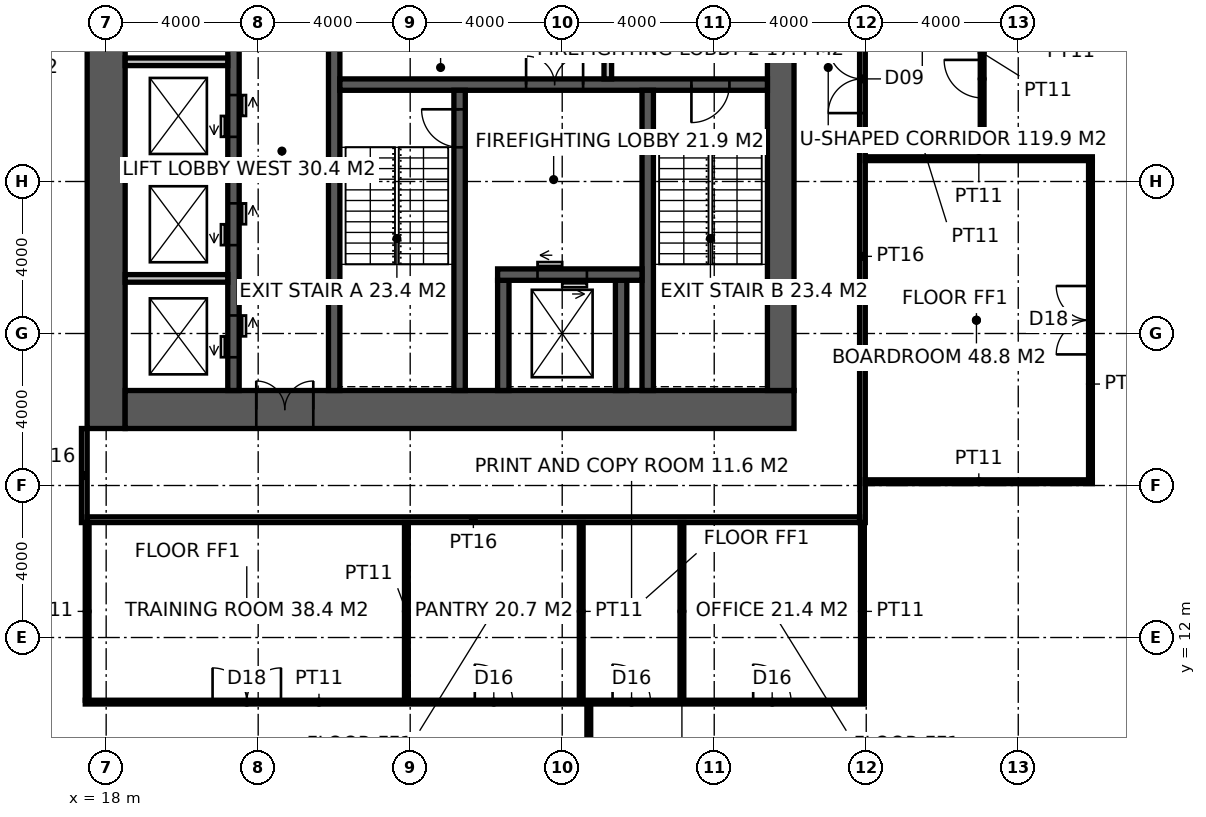
"""IFC4 building model, lengths in metres.
Left out: names, types, materials, properties, quantities, classifications, styles, units other than length and angle.
Written with IfcOpenShell. Run it as: python <this file> out.ifc"""

import sys

from ifc_helpers import new_model, si_unit, direction, frame, frame_2d, origin, place, context, subcontext, project, spatial, rectangle, extrude, element, fill, save


model = new_model("IFC4")
c1 = context("Model", 3, precision=1e-05, world=origin(), true_north=direction((0.0, 1.0)))
c2 = subcontext(c1, "Body", "Model", "MODEL_VIEW")
j1 = project(units=[si_unit("LENGTHUNIT", "METRE"), si_unit("PLANEANGLEUNIT", "RADIAN")], contexts=[c1])
p1 = place(None, origin())
s1 = spatial("IfcSite", under=j1, at=p1, CompositionType="ELEMENT")
p2 = place(p1, origin())
s2 = spatial("IfcBuilding", under=s1, at=p2, CompositionType="ELEMENT")
p3 = place(p2, frame((0.0, 0.0, 109.4)))
s3 = spatial("IfcBuildingStorey", under=s2, at=p3, CompositionType="ELEMENT", Elevation=109.4)
p4 = place(p3, frame((18.0, 17.5, -0.15), z_axis=(0.0, 0.0, 1.0), x_axis=(0.0, 1.0, 0.0)))
e1 = element("IfcWall", 1, at=p4, inside=s3, PredefinedType="SHEAR", context=c2, shape_type="SweptSolid", body=[
    extrude(rectangle(XDim=19.0, YDim=1.0, at=frame_2d((9.5, 0.0))), origin(), (0.0, 0.0, 1.0), 4.0),
])
p5 = place(p3, frame((18.5, 18.0, -0.15), z_axis=(0.0, 0.0, 1.0), x_axis=(1.0, 0.0, 0.0)))
e2 = element("IfcWall", 2, at=p5, inside=s3, PredefinedType="SHEAR", context=c2, shape_type="SweptSolid", body=[
    extrude(rectangle(XDim=17.6, YDim=1.0, at=frame_2d((8.8, 0.0))), origin(), (0.0, 0.0, 1.0), 4.0),
])
p6 = place(p5, frame((3.45, 0.0, 0.15)))
e3 = element("IfcOpeningElement", 3, at=p6, cuts=e2, PredefinedType="OPENING", context=c2, shape_type="SweptSolid", body=[
    extrude(rectangle(XDim=1.5, YDim=2.4, at=frame_2d((0.75, 1.2))), frame((0.0, 0.51, 0.0), z_axis=(0.0, -1.0, 0.0), x_axis=(1.0, 0.0, 0.0)), (0.0, 0.0, 1.0), 1.02),
])
p7 = place(p3, frame((35.75, 18.5, -0.15), z_axis=(0.0, 0.0, 1.0), x_axis=(0.0, 1.0, 0.0)))
e4 = element("IfcWall", 4, at=p7, inside=s3, PredefinedType="SHEAR", context=c2, shape_type="SweptSolid", body=[
    extrude(rectangle(XDim=17.0, YDim=0.7, at=frame_2d((8.5, 0.0))), origin(), (0.0, 0.0, 1.0), 4.0),
])
p8 = place(p7, frame((9.85, 0.0, 0.15)))
e5 = element("IfcOpeningElement", 5, at=p8, cuts=e4, PredefinedType="OPENING", context=c2, shape_type="SweptSolid", body=[
    extrude(rectangle(XDim=1.0, YDim=2.2, at=frame_2d((0.5, 1.1))), frame((0.0, 0.36, 0.0), z_axis=(0.0, -1.0, 0.0), x_axis=(1.0, 0.0, 0.0)), (0.0, 0.0, 1.0), 0.72),
])
p9 = place(p3, frame((24.0, 18.5, -0.15), z_axis=(0.0, 0.0, 1.0), x_axis=(0.0, 1.0, 0.0)))
e6 = element("IfcWall", 6, at=p9, inside=s3, PredefinedType="SHEAR", context=c2, shape_type="SweptSolid", body=[
    extrude(rectangle(XDim=17.0, YDim=0.3, at=frame_2d((8.5, 0.0))), origin(), (0.0, 0.0, 1.0), 4.0),
])
p10 = place(p9, frame((9.6, 0.0, 0.15)))
e7 = element("IfcOpeningElement", 7, at=p10, cuts=e6, PredefinedType="OPENING", context=c2, shape_type="SweptSolid", body=[
    extrude(rectangle(XDim=1.5, YDim=2.4, at=frame_2d((0.75, 1.2))), frame((0.0, 0.16, 0.0), z_axis=(0.0, -1.0, 0.0), x_axis=(1.0, 0.0, 0.0)), (0.0, 0.0, 1.0), 0.32),
])
p11 = place(p3, frame((24.15, 26.55, -0.15), z_axis=(0.0, 0.0, 1.0), x_axis=(1.0, 0.0, 0.0)))
e8 = element("IfcWall", 8, at=p11, inside=s3, PredefinedType="SHEAR", context=c2, shape_type="SweptSolid", body=[
    extrude(rectangle(XDim=11.25, YDim=0.3, at=frame_2d((5.625, 0.0))), origin(), (0.0, 0.0, 1.0), 4.0),
])
p12 = place(p11, frame((9.25, 0.0, 0.15)))
e9 = element("IfcOpeningElement", 9, at=p12, cuts=e8, PredefinedType="OPENING", context=c2, shape_type="SweptSolid", body=[
    extrude(rectangle(XDim=1.0, YDim=2.2, at=frame_2d((0.5, 1.1))), frame((0.0, 0.16, 0.0), z_axis=(0.0, -1.0, 0.0), x_axis=(1.0, 0.0, 0.0)), (0.0, 0.0, 1.0), 0.32),
])
p13 = place(p11, frame((4.9, 0.0, 0.15)))
e10 = element("IfcOpeningElement", 10, at=p13, cuts=e8, PredefinedType="OPENING", context=c2, shape_type="SweptSolid", body=[
    extrude(rectangle(XDim=1.5, YDim=2.4, at=frame_2d((0.75, 1.2))), frame((0.0, 0.16, 0.0), z_axis=(0.0, -1.0, 0.0), x_axis=(1.0, 0.0, 0.0)), (0.0, 0.0, 1.0), 0.32),
])
p14 = place(p3, frame((27.3, 18.5, -0.15), z_axis=(0.0, 0.0, 1.0), x_axis=(0.0, 1.0, 0.0)))
e11 = element("IfcWall", 11, at=p14, inside=s3, PredefinedType="SHEAR", context=c2, shape_type="SweptSolid", body=[
    extrude(rectangle(XDim=7.9, YDim=0.3, at=frame_2d((3.95, 0.0))), origin(), (0.0, 0.0, 1.0), 4.0),
])
p15 = place(p14, frame((6.4, 0.0, 0.15)))
e12 = element("IfcOpeningElement", 12, at=p15, cuts=e11, PredefinedType="OPENING", context=c2, shape_type="SweptSolid", body=[
    extrude(rectangle(XDim=1.0, YDim=2.2, at=frame_2d((0.5, 1.1))), frame((0.0, 0.16, 0.0), z_axis=(0.0, -1.0, 0.0), x_axis=(1.0, 0.0, 0.0)), (0.0, 0.0, 1.0), 0.32),
])
p16 = place(p3, frame((32.25, 18.5, -0.15), z_axis=(0.0, 0.0, 1.0), x_axis=(0.0, 1.0, 0.0)))
e13 = element("IfcWall", 13, at=p16, inside=s3, PredefinedType="SHEAR", context=c2, shape_type="SweptSolid", body=[
    extrude(rectangle(XDim=7.9, YDim=0.3, at=frame_2d((3.95, 0.0))), origin(), (0.0, 0.0, 1.0), 4.0),
])
for number, where, z_axis, x_axis in (
    (14, (28.45, 18.5, -0.15), (0.0, 0.0, 1.0), (0.0, 1.0, 0.0)),
    (15, (31.55, 18.5, -0.15), (0.0, 0.0, 1.0), (0.0, 1.0, 0.0)),
):
    element("IfcWall", number, at=place(p3, frame(where, z_axis=z_axis, x_axis=x_axis)), inside=s3, PredefinedType="SHEAR", context=c2, shape_type="SweptSolid", body=[
        extrude(rectangle(XDim=2.9, YDim=0.3, at=frame_2d((1.45, 0.0))), origin(), (0.0, 0.0, 1.0), 4.0),
    ])
p17 = place(p3, frame((28.3, 21.55, -0.15), z_axis=(0.0, 0.0, 1.0), x_axis=(1.0, 0.0, 0.0)))
e16 = element("IfcWall", 16, at=p17, inside=s3, PredefinedType="SHEAR", context=c2, shape_type="SweptSolid", body=[
    extrude(rectangle(XDim=3.8, YDim=0.3, at=frame_2d((1.9, 0.0))), origin(), (0.0, 0.0, 1.0), 4.0),
])
p18 = place(p17, frame((1.05, 0.0, 0.15)))
e17 = element("IfcOpeningElement", 17, at=p18, cuts=e16, PredefinedType="OPENING", context=c2, shape_type="SweptSolid", body=[
    extrude(rectangle(XDim=1.3, YDim=2.4, at=frame_2d((0.65, 1.2))), frame((0.0, 0.16, 0.0), z_axis=(0.0, -1.0, 0.0), x_axis=(1.0, 0.0, 0.0)), (0.0, 0.0, 1.0), 0.32),
])
p19 = place(p3, frame((21.35, 18.5, -0.15), z_axis=(0.0, 0.0, 1.0), x_axis=(0.0, 1.0, 0.0)))
e18 = element("IfcWall", 18, at=p19, inside=s3, PredefinedType="SHEAR", context=c2, shape_type="SweptSolid", body=[
    extrude(rectangle(XDim=12.5, YDim=0.3, at=frame_2d((6.25, 0.0))), origin(), (0.0, 0.0, 1.0), 4.0),
])
p20 = place(p19, frame((0.875, 0.0, 0.15)))
e19 = element("IfcOpeningElement", 19, at=p20, cuts=e18, PredefinedType="OPENING", context=c2, shape_type="SweptSolid", body=[
    extrude(rectangle(XDim=1.1, YDim=2.2, at=frame_2d((0.55, 1.1))), frame((0.0, 0.16, 0.0), z_axis=(0.0, -1.0, 0.0), x_axis=(1.0, 0.0, 0.0)), (0.0, 0.0, 1.0), 0.32),
])
p21 = place(p19, frame((3.825, 0.0, 0.15)))
e20 = element("IfcOpeningElement", 20, at=p21, cuts=e18, PredefinedType="OPENING", context=c2, shape_type="SweptSolid", body=[
    extrude(rectangle(XDim=1.1, YDim=2.2, at=frame_2d((0.55, 1.1))), frame((0.0, 0.16, 0.0), z_axis=(0.0, -1.0, 0.0), x_axis=(1.0, 0.0, 0.0)), (0.0, 0.0, 1.0), 0.32),
])
p22 = place(p19, frame((6.675, 0.0, 0.15)))
e21 = element("IfcOpeningElement", 21, at=p22, cuts=e18, PredefinedType="OPENING", context=c2, shape_type="SweptSolid", body=[
    extrude(rectangle(XDim=1.1, YDim=2.2, at=frame_2d((0.55, 1.1))), frame((0.0, 0.16, 0.0), z_axis=(0.0, -1.0, 0.0), x_axis=(1.0, 0.0, 0.0)), (0.0, 0.0, 1.0), 0.32),
])
p23 = place(p19, frame((9.575, 0.0, 0.15)))
e22 = element("IfcOpeningElement", 22, at=p23, cuts=e18, PredefinedType="OPENING", context=c2, shape_type="SweptSolid", body=[
    extrude(rectangle(XDim=1.1, YDim=2.2, at=frame_2d((0.55, 1.1))), frame((0.0, 0.16, 0.0), z_axis=(0.0, -1.0, 0.0), x_axis=(1.0, 0.0, 0.0)), (0.0, 0.0, 1.0), 0.32),
])
for number, where, z_axis, x_axis in (
    (23, (18.5, 21.45, -0.15), (0.0, 0.0, 1.0), (1.0, 0.0, 0.0)),
    (24, (18.5, 24.3, -0.15), (0.0, 0.0, 1.0), (1.0, 0.0, 0.0)),
    (25, (18.5, 27.15, -0.15), (0.0, 0.0, 1.0), (1.0, 0.0, 0.0)),
):
    element("IfcWall", number, at=place(p3, frame(where, z_axis=z_axis, x_axis=x_axis)), inside=s3, PredefinedType="SOLIDWALL", context=c2, shape_type="SweptSolid", body=[
        extrude(rectangle(XDim=2.7, YDim=0.2, at=frame_2d((1.35, 0.0))), origin(), (0.0, 0.0, 1.0), 4.0),
    ])
p24 = place(p3, frame((31.2, 26.7, 0.0), z_axis=(0.0, 0.0, 1.0), x_axis=(0.0, 1.0, 0.0)))
e26 = element("IfcWall", 26, at=p24, inside=s3, PredefinedType="SOLIDWALL", context=c2, shape_type="SweptSolid", body=[
    extrude(rectangle(XDim=4.3, YDim=0.2, at=frame_2d((2.15, 0.0))), origin(), (0.0, 0.0, 1.0), 3.85),
])
p25 = place(p3, frame((17.425, 15.025, 0.0), z_axis=(0.0, 0.0, 1.0), x_axis=(0.0, 1.0, 0.0)))
e27 = element("IfcWall", 27, at=p25, inside=s3, PredefinedType="PARTITIONING", context=c2, shape_type="SweptSolid", body=[
    extrude(rectangle(XDim=2.475, YDim=0.15, at=frame_2d((1.238, 0.0))), origin(), (0.0, 0.0, 1.0), 3.85),
])
p26 = place(p3, frame((37.9, 15.025, 0.0), z_axis=(0.0, 0.0, 1.0), x_axis=(0.0, 1.0, 0.0)))
e28 = element("IfcWall", 28, at=p26, inside=s3, PredefinedType="PARTITIONING", context=c2, shape_type="SweptSolid", body=[
    extrude(rectangle(XDim=23.35, YDim=0.15, at=frame_2d((11.675, 0.0))), origin(), (0.0, 0.0, 1.0), 2.95),
])
p27 = place(p26, frame((10.775, 0.0, 0.0)))
e29 = element("IfcOpeningElement", 29, at=p27, cuts=e28, PredefinedType="OPENING", context=c2, shape_type="SweptSolid", body=[
    extrude(rectangle(XDim=1.8, YDim=2.4, at=frame_2d((0.9, 1.2))), frame((0.0, 0.085, 0.0), z_axis=(0.0, -1.0, 0.0), x_axis=(1.0, 0.0, 0.0)), (0.0, 0.0, 1.0), 0.17),
])
p28 = place(p3, frame((17.5, 15.1, 0.0), z_axis=(0.0, 0.0, 1.0), x_axis=(1.0, 0.0, 0.0)))
e30 = element("IfcWall", 30, at=p28, inside=s3, PredefinedType="PARTITIONING", context=c2, shape_type="SweptSolid", body=[
    extrude(rectangle(XDim=20.325, YDim=0.15, at=frame_2d((10.163, 0.0))), origin(), (0.0, 0.0, 1.0), 3.85),
])
p29 = place(p3, frame((17.45, 10.3, 0.0), z_axis=(0.0, 0.0, 1.0), x_axis=(1.0, 0.0, 0.0)))
e31 = element("IfcWall", 31, at=p29, inside=s3, PredefinedType="PARTITIONING", context=c2, shape_type="SweptSolid", body=[
    extrude(rectangle(XDim=20.5, YDim=0.1, at=frame_2d((10.25, 0.0))), origin(), (0.0, 0.0, 1.0), 3.85),
])
p30 = place(p29, frame((3.35, 0.0, 0.0)))
e32 = element("IfcOpeningElement", 32, at=p30, cuts=e31, PredefinedType="OPENING", context=c2, shape_type="SweptSolid", body=[
    extrude(rectangle(XDim=1.8, YDim=2.4, at=frame_2d((0.9, 1.2))), frame((0.0, 0.06, 0.0), z_axis=(0.0, -1.0, 0.0), x_axis=(1.0, 0.0, 0.0)), (0.0, 0.0, 1.0), 0.12),
])
p31 = place(p29, frame((10.25, 0.0, 0.0)))
e33 = element("IfcOpeningElement", 33, at=p31, cuts=e31, PredefinedType="OPENING", context=c2, shape_type="SweptSolid", body=[
    extrude(rectangle(XDim=1.0, YDim=2.2, at=frame_2d((0.5, 1.1))), frame((0.0, 0.06, 0.0), z_axis=(0.0, -1.0, 0.0), x_axis=(1.0, 0.0, 0.0)), (0.0, 0.0, 1.0), 0.12),
])
p32 = place(p29, frame((13.875, 0.0, 0.0)))
e34 = element("IfcOpeningElement", 34, at=p32, cuts=e31, PredefinedType="OPENING", context=c2, shape_type="SweptSolid", body=[
    extrude(rectangle(XDim=1.0, YDim=2.2, at=frame_2d((0.5, 1.1))), frame((0.0, 0.06, 0.0), z_axis=(0.0, -1.0, 0.0), x_axis=(1.0, 0.0, 0.0)), (0.0, 0.0, 1.0), 0.12),
])
p33 = place(p29, frame((17.575, 0.0, 0.0)))
e35 = element("IfcOpeningElement", 35, at=p33, cuts=e31, PredefinedType="OPENING", context=c2, shape_type="SweptSolid", body=[
    extrude(rectangle(XDim=1.0, YDim=2.2, at=frame_2d((0.5, 1.1))), frame((0.0, 0.06, 0.0), z_axis=(0.0, -1.0, 0.0), x_axis=(1.0, 0.0, 0.0)), (0.0, 0.0, 1.0), 0.12),
])
for number, where, z_axis, x_axis in (
    (36, (37.975, 16.1, 0.0), (0.0, 0.0, 1.0), (1.0, 0.0, 0.0)),
    (37, (37.975, 24.6, 0.0), (0.0, 0.0, 1.0), (1.0, 0.0, 0.0)),
):
    element("IfcWall", number, at=place(p3, frame(where, z_axis=z_axis, x_axis=x_axis)), inside=s3, PredefinedType="PARTITIONING", context=c2, shape_type="SweptSolid", body=[
        extrude(rectangle(XDim=5.975, YDim=0.1, at=frame_2d((2.987, 0.0))), origin(), (0.0, 0.0, 1.0), 3.85),
    ])
p34 = place(p3, frame((17.5, 10.35, 0.0), z_axis=(0.0, 0.0, 1.0), x_axis=(0.0, 1.0, 0.0)))
e38 = element("IfcWall", 38, at=p34, inside=s3, PredefinedType="PARTITIONING", context=c2, shape_type="SweptSolid", body=[
    extrude(rectangle(XDim=4.675, YDim=0.1, at=frame_2d((2.337, 0.0))), origin(), (0.0, 0.0, 1.0), 3.85),
])
p35 = place(p3, frame((25.9, 10.35, 0.0), z_axis=(0.0, 0.0, 1.0), x_axis=(0.0, 1.0, 0.0)))
e39 = element("IfcWall", 39, at=p35, inside=s3, PredefinedType="PARTITIONING", context=c2, shape_type="SweptSolid", body=[
    extrude(rectangle(XDim=4.675, YDim=0.1, at=frame_2d((2.337, 0.0))), origin(), (0.0, 0.0, 1.0), 2.95),
])
for number, where, z_axis, x_axis in (
    (40, (30.5, 10.35, 0.0), (0.0, 0.0, 1.0), (0.0, 1.0, 0.0)),
    (41, (33.15, 10.35, 0.0), (0.0, 0.0, 1.0), (0.0, 1.0, 0.0)),
):
    element("IfcWall", number, at=place(p3, frame(where, z_axis=z_axis, x_axis=x_axis)), inside=s3, PredefinedType="PARTITIONING", context=c2, shape_type="SweptSolid", body=[
        extrude(rectangle(XDim=4.675, YDim=0.1, at=frame_2d((2.337, 0.0))), origin(), (0.0, 0.0, 1.0), 3.85),
    ])
p36 = place(p3, frame((37.9, 10.35, 0.0), z_axis=(0.0, 0.0, 1.0), x_axis=(0.0, 1.0, 0.0)))
e42 = element("IfcWall", 42, at=p36, inside=s3, PredefinedType="PARTITIONING", context=c2, shape_type="SweptSolid", body=[
    extrude(rectangle(XDim=4.675, YDim=0.1, at=frame_2d((2.337, 0.0))), origin(), (0.0, 0.0, 1.0), 2.95),
])
p37 = place(p3, frame((43.9, 16.15, 0.0), z_axis=(0.0, 0.0, 1.0), x_axis=(0.0, 1.0, 0.0)))
e43 = element("IfcWall", 43, at=p37, inside=s3, PredefinedType="PARTITIONING", context=c2, shape_type="SweptSolid", body=[
    extrude(rectangle(XDim=8.4, YDim=0.1, at=frame_2d((4.2, 0.0))), origin(), (0.0, 0.0, 1.0), 3.85),
])
p38 = place(p37, frame((3.3, 0.0, 0.0)))
e44 = element("IfcOpeningElement", 44, at=p38, cuts=e43, PredefinedType="OPENING", context=c2, shape_type="SweptSolid", body=[
    extrude(rectangle(XDim=1.8, YDim=2.4, at=frame_2d((0.9, 1.2))), frame((0.0, 0.06, 0.0), z_axis=(0.0, -1.0, 0.0), x_axis=(1.0, 0.0, 0.0)), (0.0, 0.0, 1.0), 0.12),
])
p39 = place(p3, frame((30.7, 4.3, 0.0), z_axis=(0.0, 0.0, 1.0), x_axis=(0.0, 1.0, 0.0)))
e45 = element("IfcWall", 45, at=p39, inside=s3, PredefinedType="PARTITIONING", context=c2, shape_type="SweptSolid", body=[
    extrude(rectangle(XDim=5.95, YDim=0.1, at=frame_2d((2.975, 0.0))), origin(), (0.0, 0.0, 1.0), 3.85),
])
p40 = place(p3, frame((37.9, 24.975, 0.0), z_axis=(0.0, 0.0, 1.0), x_axis=(1.0, 0.0, 0.0)))
e46 = element("IfcWall", 46, at=p40, inside=s3, PredefinedType="PARTITIONING", context=c2, shape_type="SweptSolid", body=[
    extrude(rectangle(XDim=3.15, YDim=0.1, at=frame_2d((1.575, 0.0))), origin(), (0.0, 0.0, 1.0), 3.85),
])
p41 = place(p3, frame((41.05, 24.975, 0.0), z_axis=(0.0, 0.0, 1.0), x_axis=(0.0, 1.0, 0.0)))
e47 = element("IfcWall", 47, at=p41, inside=s3, PredefinedType="PARTITIONING", context=c2, shape_type="SweptSolid", body=[
    extrude(rectangle(XDim=3.45, YDim=0.1, at=frame_2d((1.725, 0.0))), origin(), (0.0, 0.0, 1.0), 3.85),
])
p42 = place(p41, frame((1.225, 0.0, 0.0)))
e48 = element("IfcOpeningElement", 48, at=p42, cuts=e47, PredefinedType="OPENING", context=c2, shape_type="SweptSolid", body=[
    extrude(rectangle(XDim=1.0, YDim=2.2, at=frame_2d((0.5, 1.1))), frame((0.0, 0.06, 0.0), z_axis=(0.0, -1.0, 0.0), x_axis=(1.0, 0.0, 0.0)), (0.0, 0.0, 1.0), 0.12),
])
p43 = place(p15, origin())
e49 = element("IfcDoor", 49, at=p43, inside=s3, OperationType="SINGLE_SWING_RIGHT", PredefinedType="DOOR", context=c2, shape_type="SweptSolid", body=[
    extrude(rectangle(XDim=1.0, YDim=2.2, at=frame_2d((0.5, 1.1))), frame((0.0, 0.025, 0.0), z_axis=(0.0, -1.0, 0.0), x_axis=(1.0, 0.0, 0.0)), (0.0, 0.0, 1.0), 0.05),
])
fill(e12, e49)
p44 = place(p12, frame((1.0, 0.0, 0.0), z_axis=(0.0, 0.0, 1.0), x_axis=(-1.0, 0.0, 0.0)))
e50 = element("IfcDoor", 50, at=p44, inside=s3, OperationType="SINGLE_SWING_RIGHT", PredefinedType="DOOR", context=c2, shape_type="SweptSolid", body=[
    extrude(rectangle(XDim=1.0, YDim=2.2, at=frame_2d((0.5, 1.1))), frame((0.0, 0.025, 0.0), z_axis=(0.0, -1.0, 0.0), x_axis=(1.0, 0.0, 0.0)), (0.0, 0.0, 1.0), 0.05),
])
fill(e9, e50)
p45 = place(p13, origin())
e51 = element("IfcDoor", 51, at=p45, inside=s3, OperationType="DOUBLE_DOOR_DOUBLE_SWING", PredefinedType="DOOR", context=c2, shape_type="SweptSolid", body=[
    extrude(rectangle(XDim=1.5, YDim=2.4, at=frame_2d((0.75, 1.2))), frame((0.0, 0.025, 0.0), z_axis=(0.0, -1.0, 0.0), x_axis=(1.0, 0.0, 0.0)), (0.0, 0.0, 1.0), 0.05),
])
fill(e10, e51)
p46 = place(p6, origin())
e52 = element("IfcDoor", 52, at=p46, inside=s3, OperationType="DOUBLE_DOOR_DOUBLE_SWING", PredefinedType="DOOR", context=c2, shape_type="SweptSolid", body=[
    extrude(rectangle(XDim=1.5, YDim=2.4, at=frame_2d((0.75, 1.2))), frame((0.0, 0.025, 0.0), z_axis=(0.0, -1.0, 0.0), x_axis=(1.0, 0.0, 0.0)), (0.0, 0.0, 1.0), 0.05),
])
fill(e3, e52)
p47 = place(p27, origin())
e53 = element("IfcDoor", 53, at=p47, inside=s3, OperationType="DOUBLE_DOOR_DOUBLE_SWING", PredefinedType="DOOR", context=c2, shape_type="SweptSolid", body=[
    extrude(rectangle(XDim=1.8, YDim=2.4, at=frame_2d((0.9, 1.2))), frame((0.0, 0.025, 0.0), z_axis=(0.0, -1.0, 0.0), x_axis=(1.0, 0.0, 0.0)), (0.0, 0.0, 1.0), 0.05),
])
fill(e29, e53)
p48 = place(p30, origin())
e54 = element("IfcDoor", 54, at=p48, inside=s3, OperationType="DOUBLE_DOOR_DOUBLE_SWING", PredefinedType="DOOR", context=c2, shape_type="SweptSolid", body=[
    extrude(rectangle(XDim=1.8, YDim=2.4, at=frame_2d((0.9, 1.2))), frame((0.0, 0.025, 0.0), z_axis=(0.0, -1.0, 0.0), x_axis=(1.0, 0.0, 0.0)), (0.0, 0.0, 1.0), 0.05),
])
fill(e32, e54)
p49 = place(p31, origin())
e55 = element("IfcDoor", 55, at=p49, inside=s3, OperationType="SINGLE_SWING_LEFT", PredefinedType="DOOR", context=c2, shape_type="SweptSolid", body=[
    extrude(rectangle(XDim=1.0, YDim=2.2, at=frame_2d((0.5, 1.1))), frame((0.0, 0.025, 0.0), z_axis=(0.0, -1.0, 0.0), x_axis=(1.0, 0.0, 0.0)), (0.0, 0.0, 1.0), 0.05),
])
fill(e33, e55)
p50 = place(p32, origin())
e56 = element("IfcDoor", 56, at=p50, inside=s3, OperationType="SINGLE_SWING_LEFT", PredefinedType="DOOR", context=c2, shape_type="SweptSolid", body=[
    extrude(rectangle(XDim=1.0, YDim=2.2, at=frame_2d((0.5, 1.1))), frame((0.0, 0.025, 0.0), z_axis=(0.0, -1.0, 0.0), x_axis=(1.0, 0.0, 0.0)), (0.0, 0.0, 1.0), 0.05),
])
fill(e34, e56)
p51 = place(p33, origin())
e57 = element("IfcDoor", 57, at=p51, inside=s3, OperationType="SINGLE_SWING_LEFT", PredefinedType="DOOR", context=c2, shape_type="SweptSolid", body=[
    extrude(rectangle(XDim=1.0, YDim=2.2, at=frame_2d((0.5, 1.1))), frame((0.0, 0.025, 0.0), z_axis=(0.0, -1.0, 0.0), x_axis=(1.0, 0.0, 0.0)), (0.0, 0.0, 1.0), 0.05),
])
fill(e35, e57)
p52 = place(p38, origin())
e58 = element("IfcDoor", 58, at=p52, inside=s3, OperationType="DOUBLE_DOOR_DOUBLE_SWING", PredefinedType="DOOR", context=c2, shape_type="SweptSolid", body=[
    extrude(rectangle(XDim=1.8, YDim=2.4, at=frame_2d((0.9, 1.2))), frame((0.0, 0.025, 0.0), z_axis=(0.0, -1.0, 0.0), x_axis=(1.0, 0.0, 0.0)), (0.0, 0.0, 1.0), 0.05),
])
fill(e44, e58)
p53 = place(p42, origin())
e59 = element("IfcDoor", 59, at=p53, inside=s3, OperationType="SINGLE_SWING_RIGHT", PredefinedType="DOOR", context=c2, shape_type="SweptSolid", body=[
    extrude(rectangle(XDim=1.0, YDim=2.2, at=frame_2d((0.5, 1.1))), frame((0.0, 0.025, 0.0), z_axis=(0.0, -1.0, 0.0), x_axis=(1.0, 0.0, 0.0)), (0.0, 0.0, 1.0), 0.05),
])
fill(e48, e59)
p54 = place(p18, origin())
e60 = element("IfcDoor", 60, at=p54, inside=s3, OperationType="DOUBLE_DOOR_SLIDING", PredefinedType="DOOR", context=c2, shape_type="SweptSolid", body=[
    extrude(rectangle(XDim=1.3, YDim=2.4, at=frame_2d((0.65, 1.2))), frame((0.0, 0.025, 0.0), z_axis=(0.0, -1.0, 0.0), x_axis=(1.0, 0.0, 0.0)), (0.0, 0.0, 1.0), 0.05),
])
fill(e17, e60)
p55 = place(p20, origin())
e61 = element("IfcDoor", 61, at=p55, inside=s3, OperationType="DOUBLE_DOOR_SLIDING", PredefinedType="DOOR", context=c2, shape_type="SweptSolid", body=[
    extrude(rectangle(XDim=1.1, YDim=2.2, at=frame_2d((0.55, 1.1))), frame((0.0, 0.025, 0.0), z_axis=(0.0, -1.0, 0.0), x_axis=(1.0, 0.0, 0.0)), (0.0, 0.0, 1.0), 0.05),
])
fill(e19, e61)
p56 = place(p21, origin())
e62 = element("IfcDoor", 62, at=p56, inside=s3, OperationType="DOUBLE_DOOR_SLIDING", PredefinedType="DOOR", context=c2, shape_type="SweptSolid", body=[
    extrude(rectangle(XDim=1.1, YDim=2.2, at=frame_2d((0.55, 1.1))), frame((0.0, 0.025, 0.0), z_axis=(0.0, -1.0, 0.0), x_axis=(1.0, 0.0, 0.0)), (0.0, 0.0, 1.0), 0.05),
])
fill(e20, e62)
p57 = place(p22, origin())
e63 = element("IfcDoor", 63, at=p57, inside=s3, OperationType="DOUBLE_DOOR_SLIDING", PredefinedType="DOOR", context=c2, shape_type="SweptSolid", body=[
    extrude(rectangle(XDim=1.1, YDim=2.2, at=frame_2d((0.55, 1.1))), frame((0.0, 0.025, 0.0), z_axis=(0.0, -1.0, 0.0), x_axis=(1.0, 0.0, 0.0)), (0.0, 0.0, 1.0), 0.05),
])
fill(e21, e63)
save(model, sys.argv[1])
